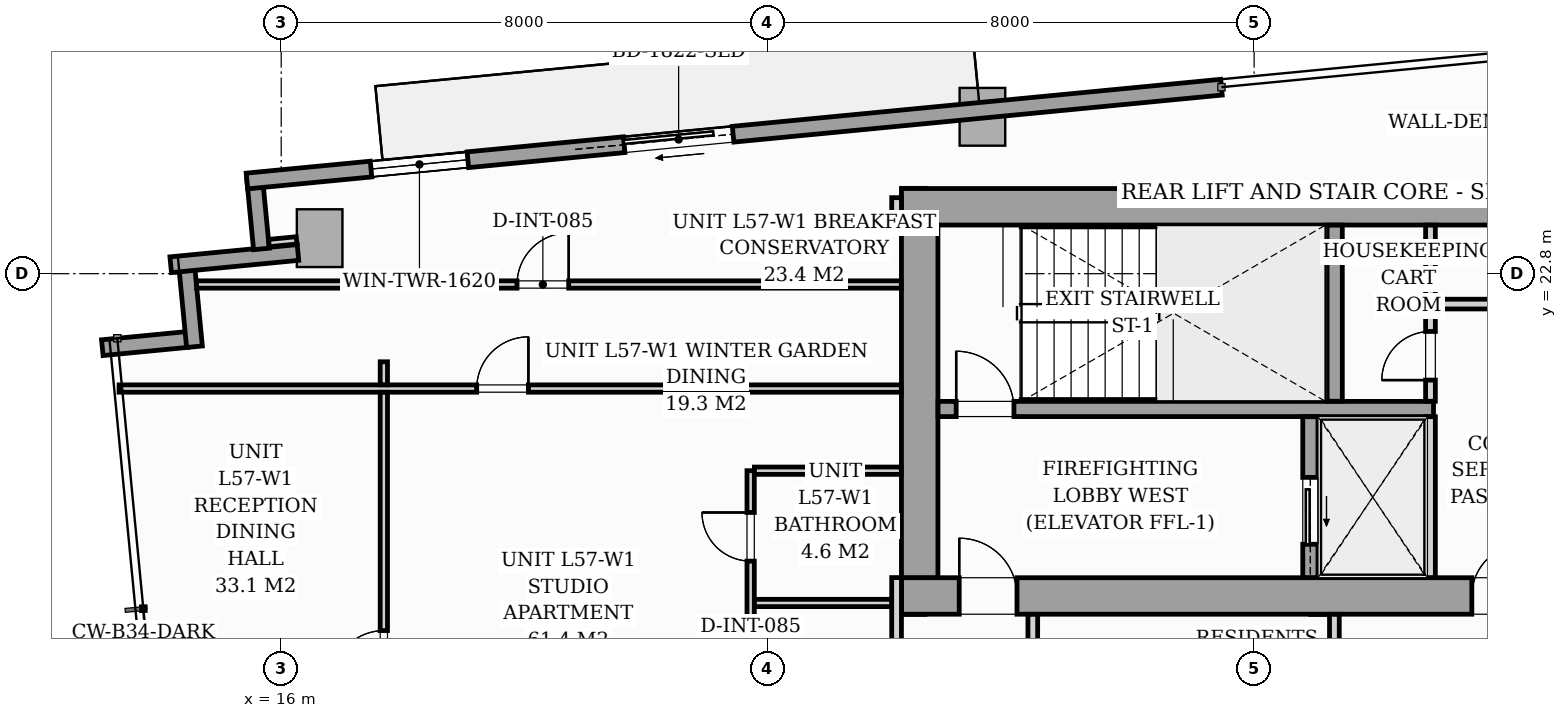
"""IFC4 building model, lengths in metres.
Left out: names, types, materials, properties, quantities, classifications, styles, units other than length and angle.
Written with IfcOpenShell. Run it as: python <this file> out.ifc"""

import sys

from ifc_helpers import new_model, si_unit, direction, frame, frame_2d, origin, origin_2d, place, context, subcontext, project, spatial, rectangle, i_section, extrude, source, transform, mapped, element, fill, save


model = new_model("IFC4")
c1 = context("Model", 3, precision=1e-05, world=origin(), true_north=direction((0.0, 1.0)))
c2 = subcontext(c1, "Body", "Model", "MODEL_VIEW")
j1 = project(units=[si_unit("LENGTHUNIT", "METRE"), si_unit("PLANEANGLEUNIT", "RADIAN")], contexts=[c1])
p1 = place(None, origin())
s1 = spatial("IfcSite", under=j1, at=p1, CompositionType="ELEMENT")
p2 = place(p1, origin())
s2 = spatial("IfcBuilding", under=s1, at=p2, CompositionType="ELEMENT")
p3 = place(p2, frame((0.0, 0.0, 198.6)))
s3 = spatial("IfcBuildingStorey", under=s2, at=p3, CompositionType="ELEMENT", Elevation=198.6)
m1 = source(origin(), c2, "Body", "SweptSolid", [
    extrude(i_section(OverallWidth=0.416, OverallDepth=0.446, WebThickness=0.039, FlangeThickness=0.063, FilletRadius=0.018, at=origin_2d()), origin(), (0.0, 0.0, 1.0), 3.196),
])
for number, where, z_axis, x_axis in (
    (1, (26.4, 17.4, 0.002), (0.0, 0.0, 1.0), (1.0, 0.0, 0.0)),
    (2, (33.12, 17.4, 0.002), (0.0, 0.0, 1.0), (1.0, 0.0, 0.0)),
    (3, (26.4, 24.0, 0.002), (0.0, 0.0, 1.0), (1.0, 0.0, 0.0)),
    (4, (33.12, 24.0, 0.002), (0.0, 0.0, 1.0), (1.0, 0.0, 0.0)),
):
    element("IfcColumn", number, at=place(p3, frame(where, z_axis=z_axis, x_axis=x_axis)), inside=s3, PredefinedType="PILASTER", context=c2, shape_type="MappedRepresentation", body=[
        mapped(m1, transform((0.0, 0.0, 0.0), scale=1.0)),
    ])
m2 = source(origin(), c2, "Body", "SweptSolid", [
    extrude(rectangle(XDim=0.75, YDim=0.95, at=origin_2d()), origin(), (0.0, 0.0, 1.0), 3.196),
])
for number, where, z_axis, x_axis in (
    (5, (16.632, 23.384, 0.002), (0.0, 0.0, 1.0), (0.995, 0.096, 0.0)),
    (6, (27.532, 25.38, 0.002), (0.0, 0.0, 1.0), (0.995, 0.096, 0.0)),
):
    element("IfcColumn", number, at=place(p3, frame(where, z_axis=z_axis, x_axis=x_axis)), inside=s3, PredefinedType="COLUMN", context=c2, shape_type="MappedRepresentation", body=[
        mapped(m2, transform((0.0, 0.0, 0.0), scale=1.0)),
    ])
p4 = place(p3, frame((13.058, 21.583, 0.0), z_axis=(0.0, 0.0, 1.0), x_axis=(0.99540774648, 0.095725744959, 0.0)))
e7 = element("IfcWall", 7, at=p4, inside=s3, PredefinedType="STANDARD", context=c2, shape_type="SweptSolid", body=[
    extrude(rectangle(XDim=1.395, YDim=0.26, at=frame_2d((0.698, 0.0))), origin(), (0.0, 0.0, 1.0), 2.94),
])
p5 = place(p3, frame((14.574, 21.599, 0.0), z_axis=(0.0, 0.0, 1.0), x_axis=(-0.095742423056, 0.99540614245, 0.0)))
e8 = element("IfcWall", 8, at=p5, inside=s3, PredefinedType="STANDARD", context=c2, shape_type="SweptSolid", body=[
    extrude(rectangle(XDim=1.395, YDim=0.26, at=frame_2d((0.697, 0.0))), origin(), (0.0, 0.0, 1.0), 2.94),
])
p6 = place(p3, frame((14.183, 22.947, 0.0), z_axis=(0.0, 0.0, 1.0), x_axis=(0.995401580483, 0.095789840651, 0.0)))
e9 = element("IfcWall", 9, at=p6, inside=s3, PredefinedType="STANDARD", context=c2, shape_type="SweptSolid", body=[
    extrude(rectangle(XDim=2.103, YDim=0.26, at=frame_2d((1.051, 0.0))), origin(), (0.0, 0.0, 1.0), 2.94),
])
p7 = place(p3, frame((15.675, 23.207, 0.0), z_axis=(0.0, 0.0, 1.0), x_axis=(-0.095951054827, 0.995386053287, 0.0)))
e10 = element("IfcWall", 10, at=p7, inside=s3, PredefinedType="STANDARD", context=c2, shape_type="SweptSolid", body=[
    extrude(rectangle(XDim=1.15, YDim=0.26, at=frame_2d((0.575, 0.0))), origin(), (0.0, 0.0, 1.0), 2.94),
])
p8 = place(p3, frame((15.437, 24.324, 0.0), z_axis=(0.0, 0.0, 1.0), x_axis=(0.995395627913, 0.095851676732, 0.0)))
e11 = element("IfcWall", 11, at=p8, inside=s3, PredefinedType="STANDARD", context=c2, shape_type="SweptSolid", body=[
    extrude(rectangle(XDim=16.1, YDim=0.26, at=frame_2d((8.05, 0.0))), origin(), (0.0, 0.0, 1.0), 2.94),
])
p9 = place(p8, frame((6.232, 0.0, 0.0)))
e12 = element("IfcOpeningElement", 12, at=p9, cuts=e11, PredefinedType="OPENING", context=c2, shape_type="SweptSolid", body=[
    extrude(rectangle(XDim=1.8, YDim=2.06, at=frame_2d((0.9, 1.03))), frame((0.0, 0.14, 0.0), z_axis=(0.0, -1.0, 0.0), x_axis=(1.0, 0.0, 0.0)), (0.0, 0.0, 1.0), 0.28),
])
p10 = place(p8, frame((2.05, 0.0, 0.65)))
e13 = element("IfcOpeningElement", 13, at=p10, cuts=e11, PredefinedType="OPENING", context=c2, shape_type="SweptSolid", body=[
    extrude(rectangle(XDim=1.6, YDim=1.5, at=frame_2d((0.8, 0.75))), frame((0.0, 0.14, 0.0), z_axis=(0.0, -1.0, 0.0), x_axis=(1.0, 0.0, 0.0)), (0.0, 0.0, 1.0), 0.28),
])
p11 = place(p3, frame((26.2, 17.5, 0.0), z_axis=(0.0, 0.0, 1.0), x_axis=(1.0, 0.0, 0.0)))
e14 = element("IfcWall", 14, at=p11, inside=s3, PredefinedType="SHEAR", context=c2, shape_type="SweptSolid", body=[
    extrude(rectangle(XDim=19.6, YDim=0.6, at=frame_2d((9.8, 0.0))), origin(), (0.0, 0.0, 1.0), 3.2),
])
p12 = place(p11, frame((0.95, 0.0, 0.0)))
e15 = element("IfcOpeningElement", 15, at=p12, cuts=e14, PredefinedType="OPENING", context=c2, shape_type="SweptSolid", body=[
    extrude(rectangle(XDim=0.95, YDim=2.06, at=frame_2d((0.475, 1.03))), frame((0.0, 0.31, 0.0), z_axis=(0.0, -1.0, 0.0), x_axis=(1.0, 0.0, 0.0)), (0.0, 0.0, 1.0), 0.62),
])
p13 = place(p11, frame((9.38, 0.0, 0.0)))
e16 = element("IfcOpeningElement", 16, at=p13, cuts=e14, PredefinedType="OPENING", context=c2, shape_type="SweptSolid", body=[
    extrude(rectangle(XDim=0.85, YDim=2.0, at=frame_2d((0.425, 1.0))), frame((0.0, 0.31, 0.0), z_axis=(0.0, -1.0, 0.0), x_axis=(1.0, 0.0, 0.0)), (0.0, 0.0, 1.0), 0.62),
])
p14 = place(p11, frame((17.55, 0.0, 0.0)))
e17 = element("IfcOpeningElement", 17, at=p14, cuts=e14, PredefinedType="OPENING", context=c2, shape_type="SweptSolid", body=[
    extrude(rectangle(XDim=0.95, YDim=2.06, at=frame_2d((0.475, 1.03))), frame((0.0, 0.31, 0.0), z_axis=(0.0, -1.0, 0.0), x_axis=(1.0, 0.0, 0.0)), (0.0, 0.0, 1.0), 0.62),
])
p15 = place(p3, frame((26.2, 23.9, 0.0), z_axis=(0.0, 0.0, 1.0), x_axis=(1.0, 0.0, 0.0)))
e18 = element("IfcWall", 18, at=p15, inside=s3, PredefinedType="SHEAR", context=c2, shape_type="SweptSolid", body=[
    extrude(rectangle(XDim=19.6, YDim=0.6, at=frame_2d((9.8, 0.0))), origin(), (0.0, 0.0, 1.0), 3.2),
])
p16 = place(p3, frame((26.5, 17.802, 0.0), z_axis=(0.0, 0.0, 1.0), x_axis=(0.0, 1.0, 0.0)))
e19 = element("IfcWall", 19, at=p16, inside=s3, PredefinedType="SHEAR", context=c2, shape_type="SweptSolid", body=[
    extrude(rectangle(XDim=5.796, YDim=0.6, at=frame_2d((2.898, 0.0))), origin(), (0.0, 0.0, 1.0), 3.2),
])
p17 = place(p3, frame((26.802, 20.575, 0.0), z_axis=(0.0, 0.0, 1.0), x_axis=(1.0, 0.0, 0.0)))
e20 = element("IfcWall", 20, at=p17, inside=s3, PredefinedType="SOLIDWALL", context=c2, shape_type="SweptSolid", body=[
    extrude(rectangle(XDim=8.148, YDim=0.25, at=frame_2d((4.074, 0.0))), origin(), (0.0, 0.0, 1.0), 3.2),
])
p18 = place(p17, frame((0.298, 0.0, 0.0)))
e21 = element("IfcOpeningElement", 21, at=p18, cuts=e20, PredefinedType="OPENING", context=c2, shape_type="SweptSolid", body=[
    extrude(rectangle(XDim=0.95, YDim=2.06, at=frame_2d((0.475, 1.03))), frame((0.0, 0.135, 0.0), z_axis=(0.0, -1.0, 0.0), x_axis=(1.0, 0.0, 0.0)), (0.0, 0.0, 1.0), 0.27),
])
p19 = place(p3, frame((33.325, 20.702, 0.0), z_axis=(0.0, 0.0, 1.0), x_axis=(0.0, 1.0, 0.0)))
e22 = element("IfcWall", 22, at=p19, inside=s3, PredefinedType="SOLIDWALL", context=c2, shape_type="SweptSolid", body=[
    extrude(rectangle(XDim=2.896, YDim=0.25, at=frame_2d((1.448, 0.0))), origin(), (0.0, 0.0, 1.0), 3.2),
])
p20 = place(p3, frame((32.925, 17.802, 0.0), z_axis=(0.0, 0.0, 1.0), x_axis=(0.0, 1.0, 0.0)))
e23 = element("IfcWall", 23, at=p20, inside=s3, PredefinedType="SOLIDWALL", context=c2, shape_type="SweptSolid", body=[
    extrude(rectangle(XDim=2.646, YDim=0.25, at=frame_2d((1.323, 0.0))), origin(), (0.0, 0.0, 1.0), 3.2),
])
p21 = place(p20, frame((0.548, 0.0, 0.0)))
e24 = element("IfcOpeningElement", 24, at=p21, cuts=e23, PredefinedType="OPENING", context=c2, shape_type="SweptSolid", body=[
    extrude(rectangle(XDim=1.1, YDim=2.08, at=frame_2d((0.55, 1.04))), frame((0.0, 0.135, 0.0), z_axis=(0.0, -1.0, 0.0), x_axis=(1.0, 0.0, 0.0)), (0.0, 0.0, 1.0), 0.27),
])
p22 = place(p3, frame((34.9, 17.802, 0.0), z_axis=(0.0, 0.0, 1.0), x_axis=(0.0, 1.0, 0.0)))
e25 = element("IfcWall", 25, at=p22, inside=s3, PredefinedType="PARTITIONING", context=c2, shape_type="SweptSolid", body=[
    extrude(rectangle(XDim=2.646, YDim=0.16, at=frame_2d((1.323, 0.0))), origin(), (0.0, 0.0, 1.0), 2.94),
])
p23 = place(p3, frame((34.9, 20.702, 0.0), z_axis=(0.0, 0.0, 1.0), x_axis=(0.0, 1.0, 0.0)))
e26 = element("IfcWall", 26, at=p23, inside=s3, PredefinedType="PARTITIONING", context=c2, shape_type="SweptSolid", body=[
    extrude(rectangle(XDim=2.896, YDim=0.16, at=frame_2d((1.448, 0.0))), origin(), (0.0, 0.0, 1.0), 2.94),
])
p24 = place(p23, frame((0.348, 0.0, 0.0)))
e27 = element("IfcOpeningElement", 27, at=p24, cuts=e26, PredefinedType="OPENING", context=c2, shape_type="SweptSolid", body=[
    extrude(rectangle(XDim=0.8, YDim=2.05, at=frame_2d((0.4, 1.025))), frame((0.0, 0.09, 0.0), z_axis=(0.0, -1.0, 0.0), x_axis=(1.0, 0.0, 0.0)), (0.0, 0.0, 1.0), 0.18),
])
p25 = place(p3, frame((34.982, 22.3, 0.0), z_axis=(0.0, 0.0, 1.0), x_axis=(1.0, 0.0, 0.0)))
e28 = element("IfcWall", 28, at=p25, inside=s3, PredefinedType="PARTITIONING", context=c2, shape_type="SweptSolid", body=[
    extrude(rectangle(XDim=3.566, YDim=0.16, at=frame_2d((1.783, 0.0))), origin(), (0.0, 0.0, 1.0), 2.94),
])
p26 = place(p25, frame((1.378, 0.0, 0.0)))
e29 = element("IfcOpeningElement", 29, at=p26, cuts=e28, PredefinedType="OPENING", context=c2, shape_type="SweptSolid", body=[
    extrude(rectangle(XDim=0.8, YDim=2.05, at=frame_2d((0.4, 1.025))), frame((0.0, 0.09, 0.0), z_axis=(0.0, -1.0, 0.0), x_axis=(1.0, 0.0, 0.0)), (0.0, 0.0, 1.0), 0.18),
])
p27 = place(p3, frame((26.12, 13.442, 0.0), z_axis=(0.0, 0.0, 1.0), x_axis=(0.0, 1.0, 0.0)))
e30 = element("IfcWall", 30, at=p27, inside=s3, PredefinedType="PARTITIONING", context=c2, shape_type="SweptSolid", body=[
    extrude(rectangle(XDim=4.36, YDim=0.16, at=frame_2d((2.18, 0.0))), origin(), (0.0, 0.0, 1.0), 2.94),
])
p28 = place(p27, frame((0.493, 0.0, 0.0)))
e31 = element("IfcOpeningElement", 31, at=p28, cuts=e30, PredefinedType="OPENING", context=c2, shape_type="SweptSolid", body=[
    extrude(rectangle(XDim=0.95, YDim=2.06, at=frame_2d((0.475, 1.03))), frame((0.0, 0.09, 0.0), z_axis=(0.0, -1.0, 0.0), x_axis=(1.0, 0.0, 0.0)), (0.0, 0.0, 1.0), 0.18),
])
p29 = place(p3, frame((26.12, 23.598, 0.0), z_axis=(0.0, 0.0, 1.0), x_axis=(0.0, 1.0, 0.0)))
e32 = element("IfcWall", 32, at=p29, inside=s3, PredefinedType="PARTITIONING", context=c2, shape_type="SweptSolid", body=[
    extrude(rectangle(XDim=0.452, YDim=0.16, at=frame_2d((0.226, 0.0))), origin(), (0.0, 0.0, 1.0), 2.94),
])
p30 = place(p3, frame((23.72, 15.21, 0.0), z_axis=(0.0, 0.0, 1.0), x_axis=(0.0, 1.0, 0.0)))
e33 = element("IfcWall", 33, at=p30, inside=s3, PredefinedType="PARTITIONING", context=c2, shape_type="SweptSolid", body=[
    extrude(rectangle(XDim=4.35, YDim=0.12, at=frame_2d((2.175, 0.0))), origin(), (0.0, 0.0, 1.0), 2.94),
])
p31 = place(p30, frame((0.662, 0.0, 0.0)))
e34 = element("IfcOpeningElement", 34, at=p31, cuts=e33, PredefinedType="OPENING", context=c2, shape_type="SweptSolid", body=[
    extrude(rectangle(XDim=0.85, YDim=2.05, at=frame_2d((0.425, 1.025))), frame((0.0, 0.07, 0.0), z_axis=(0.0, -1.0, 0.0), x_axis=(1.0, 0.0, 0.0)), (0.0, 0.0, 1.0), 0.14),
])
p32 = place(p30, frame((2.863, 0.0, 0.0)))
e35 = element("IfcOpeningElement", 35, at=p32, cuts=e33, PredefinedType="OPENING", context=c2, shape_type="SweptSolid", body=[
    extrude(rectangle(XDim=0.8, YDim=2.02, at=frame_2d((0.4, 1.01))), frame((0.0, 0.07, 0.0), z_axis=(0.0, -1.0, 0.0), x_axis=(1.0, 0.0, 0.0)), (0.0, 0.0, 1.0), 0.14),
])
p33 = place(p3, frame((23.782, 17.385, 0.0), z_axis=(0.0, 0.0, 1.0), x_axis=(1.0, 0.0, 0.0)))
e36 = element("IfcWall", 36, at=p33, inside=s3, PredefinedType="PARTITIONING", context=c2, shape_type="SweptSolid", body=[
    extrude(rectangle(XDim=2.256, YDim=0.12, at=frame_2d((1.128, 0.0))), origin(), (0.0, 0.0, 1.0), 2.281),
])
p34 = place(p3, frame((23.782, 19.56, 0.0), z_axis=(0.0, 0.0, 1.0), x_axis=(1.0, 0.0, 0.0)))
e37 = element("IfcWall", 37, at=p34, inside=s3, PredefinedType="PARTITIONING", context=c2, shape_type="SweptSolid", body=[
    extrude(rectangle(XDim=2.416, YDim=0.12, at=frame_2d((1.208, 0.0))), origin(), (0.0, 0.0, 1.0), 2.94),
])
p35 = place(p3, frame((14.608, 22.622, 0.0), z_axis=(0.0, 0.0, 1.0), x_axis=(1.0, 0.0, 0.0)))
e38 = element("IfcWall", 38, at=p35, inside=s3, PredefinedType="PARTITIONING", context=c2, shape_type="SweptSolid", body=[
    extrude(rectangle(XDim=11.59, YDim=0.12, at=frame_2d((5.795, 0.0))), origin(), (0.0, 0.0, 1.0), 2.94),
])
p36 = place(p35, frame((5.27, 0.0, 0.0)))
e39 = element("IfcOpeningElement", 39, at=p36, cuts=e38, PredefinedType="OPENING", context=c2, shape_type="SweptSolid", body=[
    extrude(rectangle(XDim=0.85, YDim=2.05, at=frame_2d((0.425, 1.025))), frame((0.0, 0.07, 0.0), z_axis=(0.0, -1.0, 0.0), x_axis=(1.0, 0.0, 0.0)), (0.0, 0.0, 1.0), 0.14),
])
p37 = place(p3, frame((13.334, 20.911, 0.0), z_axis=(0.0, 0.0, 1.0), x_axis=(1.0, 0.0, 0.0)))
e40 = element("IfcWall", 40, at=p37, inside=s3, PredefinedType="PARTITIONING", context=c2, shape_type="SweptSolid", body=[
    extrude(rectangle(XDim=12.864, YDim=0.12, at=frame_2d((6.432, 0.0))), origin(), (0.0, 0.0, 1.0), 2.94),
])
p38 = place(p37, frame((5.881, 0.0, 0.0)))
e41 = element("IfcOpeningElement", 41, at=p38, cuts=e40, PredefinedType="OPENING", context=c2, shape_type="SweptSolid", body=[
    extrude(rectangle(XDim=0.85, YDim=2.05, at=frame_2d((0.425, 1.025))), frame((0.0, 0.07, 0.0), z_axis=(0.0, -1.0, 0.0), x_axis=(1.0, 0.0, 0.0)), (0.0, 0.0, 1.0), 0.14),
])
p39 = place(p3, frame((17.688, 12.16, 0.0), z_axis=(0.0, 0.0, 1.0), x_axis=(0.0, 1.0, 0.0)))
e42 = element("IfcWall", 42, at=p39, inside=s3, PredefinedType="PARTITIONING", context=c2, shape_type="SweptSolid", body=[
    extrude(rectangle(XDim=8.689, YDim=0.12, at=frame_2d((4.345, 0.0))), origin(), (0.0, 0.0, 1.0), 2.94),
])
p40 = place(p39, frame((3.92, 0.0, 0.0)))
e43 = element("IfcOpeningElement", 43, at=p40, cuts=e42, PredefinedType="OPENING", context=c2, shape_type="SweptSolid", body=[
    extrude(rectangle(XDim=0.85, YDim=2.05, at=frame_2d((0.425, 1.025))), frame((0.0, 0.07, 0.0), z_axis=(0.0, -1.0, 0.0), x_axis=(1.0, 0.0, 0.0)), (0.0, 0.0, 1.0), 0.14),
])
p41 = place(p3, frame((17.688, 20.973, 0.0), z_axis=(0.0, 0.0, 1.0), x_axis=(0.0, 1.0, 0.0)))
e44 = element("IfcWall", 44, at=p41, inside=s3, PredefinedType="PARTITIONING", context=c2, shape_type="SweptSolid", body=[
    extrude(rectangle(XDim=0.378, YDim=0.12, at=frame_2d((0.189, 0.0))), origin(), (0.0, 0.0, 1.0), 2.94),
])
for number, where, z_axis, x_axis in (
    (45, (28.36, 14.7, 0.0), (0.0, 0.0, 1.0), (0.0, 1.0, 0.0)),
    (46, (33.32, 14.7, 0.0), (0.0, 0.0, 1.0), (0.0, 1.0, 0.0)),
):
    element("IfcWall", number, at=place(p3, frame(where, z_axis=z_axis, x_axis=x_axis)), inside=s3, PredefinedType="PARTITIONING", context=c2, shape_type="SweptSolid", body=[
        extrude(rectangle(XDim=2.498, YDim=0.16, at=frame_2d((1.249, 0.0))), origin(), (0.0, 0.0, 1.0), 2.94),
    ])
p42 = place(p3, frame((16.254, 23.348, 0.0), z_axis=(0.0, 0.0, 1.0), x_axis=(-0.995389482415, -0.095915474751, 0.0)))
e47 = element("IfcWall", 47, at=p42, inside=s3, PredefinedType="PARTITIONING", context=c2, shape_type="SweptSolid", body=[
    extrude(rectangle(XDim=0.458, YDim=0.12, at=frame_2d((0.229, 0.0))), origin(), (0.0, 0.0, 1.0), 2.94),
])
m3 = source(origin(), c2, "Body", "SweptSolid", [
    extrude(rectangle(XDim=1.8, YDim=2.06, at=frame_2d((0.9, 1.03))), frame((0.0, 0.025, 0.0), z_axis=(0.0, -1.0, 0.0), x_axis=(1.0, 0.0, 0.0)), (0.0, 0.0, 1.0), 0.05),
])
p43 = place(p9, origin())
e48 = element("IfcDoor", 48, at=p43, inside=s3, OperationType="SLIDING_TO_LEFT", PredefinedType="DOOR", context=c2, shape_type="MappedRepresentation", body=[
    mapped(m3, transform((0.0, 0.0, 0.0), scale=1.0)),
])
fill(e12, e48)
m4 = source(origin(), c2, "Body", "SweptSolid", [
    extrude(rectangle(XDim=1.6, YDim=1.5, at=frame_2d((0.8, 0.75))), frame((0.0, 0.03, 0.0), z_axis=(0.0, -1.0, 0.0), x_axis=(1.0, 0.0, 0.0)), (0.0, 0.0, 1.0), 0.06),
])
p44 = place(p10, origin())
e49 = element("IfcWindow", 49, at=p44, inside=s3, PartitioningType="SINGLE_PANEL", PredefinedType="WINDOW", context=c2, shape_type="MappedRepresentation", body=[
    mapped(m4, transform((0.0, 0.0, 0.0), scale=1.0)),
])
fill(e13, e49)
m5 = source(origin(), c2, "Body", "SweptSolid", [
    extrude(rectangle(XDim=0.95, YDim=2.06, at=frame_2d((0.475, 1.03))), frame((0.0, 0.025, 0.0), z_axis=(0.0, -1.0, 0.0), x_axis=(1.0, 0.0, 0.0)), (0.0, 0.0, 1.0), 0.05),
])
p45 = place(p12, origin())
e50 = element("IfcDoor", 50, at=p45, inside=s3, OperationType="SINGLE_SWING_LEFT", PredefinedType="DOOR", context=c2, shape_type="MappedRepresentation", body=[
    mapped(m5, transform((0.0, 0.0, 0.0), scale=1.0)),
])
fill(e15, e50)
m6 = source(origin(), c2, "Body", "SweptSolid", [
    extrude(rectangle(XDim=0.85, YDim=2.0, at=frame_2d((0.425, 1.0))), frame((0.0, 0.025, 0.0), z_axis=(0.0, -1.0, 0.0), x_axis=(1.0, 0.0, 0.0)), (0.0, 0.0, 1.0), 0.05),
])
p46 = place(p13, origin())
e51 = element("IfcDoor", 51, at=p46, inside=s3, OperationType="SINGLE_SWING_RIGHT", PredefinedType="DOOR", context=c2, shape_type="MappedRepresentation", body=[
    mapped(m6, transform((0.0, 0.0, 0.0), scale=1.0)),
])
fill(e16, e51)
p47 = place(p18, origin())
e52 = element("IfcDoor", 52, at=p47, inside=s3, OperationType="SINGLE_SWING_LEFT", PredefinedType="DOOR", context=c2, shape_type="MappedRepresentation", body=[
    mapped(m5, transform((0.0, 0.0, 0.0), scale=1.0)),
])
fill(e21, e52)
m7 = source(origin(), c2, "Body", "SweptSolid", [
    extrude(rectangle(XDim=1.1, YDim=2.08, at=frame_2d((0.55, 1.04))), frame((0.0, 0.025, 0.0), z_axis=(0.0, -1.0, 0.0), x_axis=(1.0, 0.0, 0.0)), (0.0, 0.0, 1.0), 0.05),
])
p48 = place(p21, origin())
e53 = element("IfcDoor", 53, at=p48, inside=s3, OperationType="SLIDING_TO_LEFT", PredefinedType="DOOR", context=c2, shape_type="MappedRepresentation", body=[
    mapped(m7, transform((0.0, 0.0, 0.0), scale=1.0)),
])
fill(e24, e53)
m8 = source(origin(), c2, "Body", "SweptSolid", [
    extrude(rectangle(XDim=0.8, YDim=2.05, at=frame_2d((0.4, 1.025))), frame((0.0, 0.025, 0.0), z_axis=(0.0, -1.0, 0.0), x_axis=(1.0, 0.0, 0.0)), (0.0, 0.0, 1.0), 0.05),
])
p49 = place(p24, origin())
e54 = element("IfcDoor", 54, at=p49, inside=s3, OperationType="SINGLE_SWING_LEFT", PredefinedType="DOOR", context=c2, shape_type="MappedRepresentation", body=[
    mapped(m8, transform((0.0, 0.0, 0.0), scale=1.0)),
])
fill(e27, e54)
m9 = source(origin(), c2, "Body", "SweptSolid", [
    extrude(rectangle(XDim=0.8, YDim=2.02, at=frame_2d((0.4, 1.01))), frame((0.0, 0.025, 0.0), z_axis=(0.0, -1.0, 0.0), x_axis=(1.0, 0.0, 0.0)), (0.0, 0.0, 1.0), 0.05),
])
p50 = place(p32, origin())
e55 = element("IfcDoor", 55, at=p50, inside=s3, OperationType="SINGLE_SWING_RIGHT", PredefinedType="DOOR", context=c2, shape_type="MappedRepresentation", body=[
    mapped(m9, transform((0.0, 0.0, 0.0), scale=1.0)),
])
fill(e35, e55)
m10 = source(origin(), c2, "Body", "SweptSolid", [
    extrude(rectangle(XDim=0.85, YDim=2.05, at=frame_2d((0.425, 1.025))), frame((0.0, 0.025, 0.0), z_axis=(0.0, -1.0, 0.0), x_axis=(1.0, 0.0, 0.0)), (0.0, 0.0, 1.0), 0.05),
])
p51 = place(p36, origin())
e56 = element("IfcDoor", 56, at=p51, inside=s3, OperationType="SINGLE_SWING_RIGHT", PredefinedType="DOOR", context=c2, shape_type="MappedRepresentation", body=[
    mapped(m10, transform((0.0, 0.0, 0.0), scale=1.0)),
])
fill(e39, e56)
p52 = place(p38, origin())
e57 = element("IfcDoor", 57, at=p52, inside=s3, OperationType="SINGLE_SWING_RIGHT", PredefinedType="DOOR", context=c2, shape_type="MappedRepresentation", body=[
    mapped(m10, transform((0.0, 0.0, 0.0), scale=1.0)),
])
fill(e41, e57)
p53 = place(p40, origin())
e58 = element("IfcDoor", 58, at=p53, inside=s3, OperationType="SINGLE_SWING_LEFT", PredefinedType="DOOR", context=c2, shape_type="MappedRepresentation", body=[
    mapped(m10, transform((0.0, 0.0, 0.0), scale=1.0)),
])
fill(e43, e58)
save(model, sys.argv[1])
